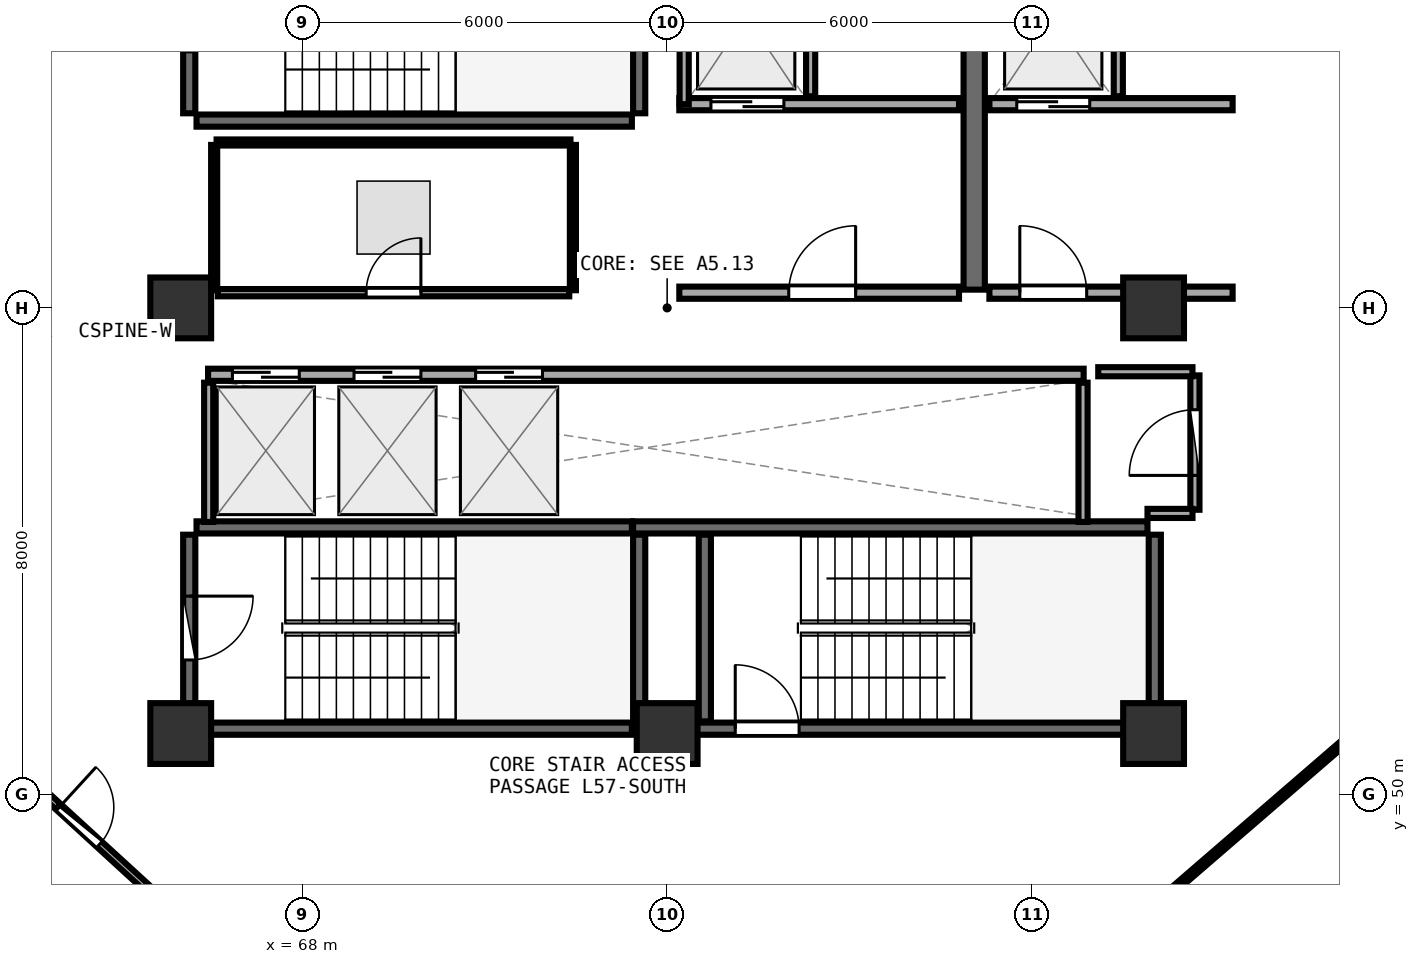
"""IFC4 building model, lengths in metres.
Left out: names, types, materials, properties, quantities, classifications, styles, units other than length and angle.
Written with IfcOpenShell. Run it as: python <this file> out.ifc"""

import sys

from ifc_helpers import new_model, si_unit, direction, frame, frame_2d, origin, origin_2d, place, context, subcontext, project, spatial, rectangle, extrude, element, fill, save


model = new_model("IFC4")
c1 = context("Model", 3, precision=1e-05, world=origin(), true_north=direction((0.0, 1.0)))
c2 = subcontext(c1, "Body", "Model", "MODEL_VIEW")
j1 = project(units=[si_unit("LENGTHUNIT", "METRE"), si_unit("PLANEANGLEUNIT", "RADIAN")], contexts=[c1])
p1 = place(None, origin())
s1 = spatial("IfcSite", under=j1, at=p1, CompositionType="ELEMENT")
p2 = place(p1, origin())
s2 = spatial("IfcBuilding", under=s1, at=p2, CompositionType="ELEMENT")
p3 = place(p2, frame((0.0, 0.0, 223.2)))
s3 = spatial("IfcBuildingStorey", under=s2, at=p3, CompositionType="ELEMENT", Elevation=223.2)
for number, where, z_axis, x_axis in (
    (1, (66.0, 51.0, 0.0), (0.0, 0.0, 1.0), (1.0, 0.0, 0.0)),
    (2, (74.0, 51.0, 0.0), (0.0, 0.0, 1.0), (1.0, 0.0, 0.0)),
    (3, (82.0, 51.0, 0.0), (0.0, 0.0, 1.0), (1.0, 0.0, 0.0)),
    (4, (82.0, 58.0, 0.0), (0.0, 0.0, 1.0), (1.0, 0.0, 0.0)),
    (5, (66.0, 58.0, 0.0), (0.0, 0.0, 1.0), (1.0, 0.0, 0.0)),
):
    element("IfcColumn", number, at=place(p3, frame(where, z_axis=z_axis, x_axis=x_axis)), inside=s3, PredefinedType="PILASTER", context=c2, shape_type="SweptSolid", body=[
        extrude(rectangle(XDim=1.0, YDim=1.0, at=origin_2d()), origin(), (0.0, 0.0, 1.0), 3.75),
    ])
p4 = place(p3, frame((66.26, 61.08, 0.0), z_axis=(0.0, 0.0, 1.0), x_axis=(1.0, 0.0, 0.0)))
e6 = element("IfcWall", 6, at=p4, inside=s3, PredefinedType="SHEAR", context=c2, shape_type="SweptSolid", body=[
    extrude(rectangle(XDim=7.16, YDim=0.2, at=frame_2d((3.58, 0.0))), origin(), (0.0, 0.0, 1.0), 3.49),
])
p5 = place(p3, frame((73.54, 61.2, 0.0), z_axis=(0.0, 0.0, 1.0), x_axis=(0.0, 1.0, 0.0)))
e7 = element("IfcWall", 7, at=p5, inside=s3, PredefinedType="SHEAR", context=c2, shape_type="SweptSolid", body=[
    extrude(rectangle(XDim=3.07, YDim=0.2, at=frame_2d((1.535, 0.0))), origin(), (0.0, 0.0, 1.0), 3.49),
])
p6 = place(p3, frame((66.14, 64.27, 0.0), z_axis=(0.0, 0.0, 1.0), x_axis=(0.0, -1.0, 0.0)))
e8 = element("IfcWall", 8, at=p6, inside=s3, PredefinedType="SHEAR", context=c2, shape_type="SweptSolid", body=[
    extrude(rectangle(XDim=3.07, YDim=0.2, at=frame_2d((1.535, 0.0))), origin(), (0.0, 0.0, 1.0), 3.49),
])
p7 = place(p6, frame((1.01, 0.0, 0.0)))
e9 = element("IfcOpeningElement", 9, at=p7, cuts=e8, PredefinedType="OPENING", context=c2, shape_type="SweptSolid", body=[
    extrude(rectangle(XDim=1.05, YDim=2.1, at=frame_2d((0.525, 1.05))), frame((0.0, 0.11, 0.0), z_axis=(0.0, -1.0, 0.0), x_axis=(1.0, 0.0, 0.0)), (0.0, 0.0, 1.0), 0.22),
])
p8 = place(p3, frame((74.0, 51.08, 0.0), z_axis=(0.0, 0.0, 1.0), x_axis=(1.0, 0.0, 0.0)))
e10 = element("IfcWall", 10, at=p8, inside=s3, PredefinedType="SHEAR", context=c2, shape_type="SweptSolid", body=[
    extrude(rectangle(XDim=7.9, YDim=0.2, at=frame_2d((3.95, 0.0))), origin(), (0.0, 0.0, 1.0), 3.49),
])
p9 = place(p8, frame((1.12, 0.0, 0.0)))
e11 = element("IfcOpeningElement", 11, at=p9, cuts=e10, PredefinedType="OPENING", context=c2, shape_type="SweptSolid", body=[
    extrude(rectangle(XDim=1.05, YDim=2.1, at=frame_2d((0.525, 1.05))), frame((0.0, 0.11, 0.0), z_axis=(0.0, -1.0, 0.0), x_axis=(1.0, 0.0, 0.0)), (0.0, 0.0, 1.0), 0.22),
])
p10 = place(p3, frame((82.02, 51.2, 0.0), z_axis=(0.0, 0.0, 1.0), x_axis=(0.0, 1.0, 0.0)))
e12 = element("IfcWall", 12, at=p10, inside=s3, PredefinedType="SHEAR", context=c2, shape_type="SweptSolid", body=[
    extrude(rectangle(XDim=3.07, YDim=0.2, at=frame_2d((1.535, 0.0))), origin(), (0.0, 0.0, 1.0), 3.49),
])
p11 = place(p3, frame((81.9, 54.39, 0.0), z_axis=(0.0, 0.0, 1.0), x_axis=(-1.0, 0.0, 0.0)))
e13 = element("IfcWall", 13, at=p11, inside=s3, PredefinedType="SHEAR", context=c2, shape_type="SweptSolid", body=[
    extrude(rectangle(XDim=8.46, YDim=0.2, at=frame_2d((4.23, 0.0))), origin(), (0.0, 0.0, 1.0), 3.49),
])
p12 = place(p3, frame((74.62, 54.27, 0.0), z_axis=(0.0, 0.0, 1.0), x_axis=(0.0, -1.0, 0.0)))
e14 = element("IfcWall", 14, at=p12, inside=s3, PredefinedType="SHEAR", context=c2, shape_type="SweptSolid", body=[
    extrude(rectangle(XDim=3.07, YDim=0.2, at=frame_2d((1.535, 0.0))), origin(), (0.0, 0.0, 1.0), 3.49),
])
p13 = place(p3, frame((66.26, 51.08, 0.0), z_axis=(0.0, 0.0, 1.0), x_axis=(1.0, 0.0, 0.0)))
e15 = element("IfcWall", 15, at=p13, inside=s3, PredefinedType="SHEAR", context=c2, shape_type="SweptSolid", body=[
    extrude(rectangle(XDim=7.16, YDim=0.2, at=frame_2d((3.58, 0.0))), origin(), (0.0, 0.0, 1.0), 3.49),
])
p14 = place(p3, frame((73.54, 51.2, 0.0), z_axis=(0.0, 0.0, 1.0), x_axis=(0.0, 1.0, 0.0)))
e16 = element("IfcWall", 16, at=p14, inside=s3, PredefinedType="SHEAR", context=c2, shape_type="SweptSolid", body=[
    extrude(rectangle(XDim=3.07, YDim=0.2, at=frame_2d((1.535, 0.0))), origin(), (0.0, 0.0, 1.0), 3.49),
])
p15 = place(p3, frame((73.42, 54.39, 0.0), z_axis=(0.0, 0.0, 1.0), x_axis=(-1.0, 0.0, 0.0)))
e17 = element("IfcWall", 17, at=p15, inside=s3, PredefinedType="SHEAR", context=c2, shape_type="SweptSolid", body=[
    extrude(rectangle(XDim=7.16, YDim=0.2, at=frame_2d((3.58, 0.0))), origin(), (0.0, 0.0, 1.0), 3.49),
])
p16 = place(p3, frame((66.14, 54.27, 0.0), z_axis=(0.0, 0.0, 1.0), x_axis=(0.0, -1.0, 0.0)))
e18 = element("IfcWall", 18, at=p16, inside=s3, PredefinedType="SHEAR", context=c2, shape_type="SweptSolid", body=[
    extrude(rectangle(XDim=3.07, YDim=0.2, at=frame_2d((1.535, 0.0))), origin(), (0.0, 0.0, 1.0), 3.49),
])
p17 = place(p16, frame((1.01, 0.0, 0.0)))
e19 = element("IfcOpeningElement", 19, at=p17, cuts=e18, PredefinedType="OPENING", context=c2, shape_type="SweptSolid", body=[
    extrude(rectangle(XDim=1.05, YDim=2.1, at=frame_2d((0.525, 1.05))), frame((0.0, 0.11, 0.0), z_axis=(0.0, -1.0, 0.0), x_axis=(1.0, 0.0, 0.0)), (0.0, 0.0, 1.0), 0.22),
])
p18 = place(p3, frame((79.05, 58.3, 0.0), z_axis=(0.0, 0.0, 1.0), x_axis=(0.0, 1.0, 0.0)))
e20 = element("IfcWall", 20, at=p18, inside=s3, PredefinedType="SHEAR", context=c2, shape_type="SweptSolid", body=[
    extrude(rectangle(XDim=6.3, YDim=0.35, at=frame_2d((3.15, 0.0))), origin(), (0.0, 0.0, 1.0), 3.49),
])
p19 = place(p3, frame((74.2, 61.35, 0.0), z_axis=(0.0, 0.0, 1.0), x_axis=(1.0, 0.0, 0.0)))
e21 = element("IfcWall", 21, at=p19, inside=s3, PredefinedType="SOLIDWALL", context=c2, shape_type="SweptSolid", body=[
    extrude(rectangle(XDim=4.6, YDim=0.2, at=frame_2d((2.3, 0.0))), origin(), (0.0, 0.0, 1.0), 3.48),
])
p20 = place(p19, frame((0.52, 0.0, 0.0)))
e22 = element("IfcOpeningElement", 22, at=p20, cuts=e21, PredefinedType="OPENING", context=c2, shape_type="SweptSolid", body=[
    extrude(rectangle(XDim=1.2, YDim=2.15, at=frame_2d((0.6, 1.075))), frame((0.0, 0.11, 0.0), z_axis=(0.0, -1.0, 0.0), x_axis=(1.0, 0.0, 0.0)), (0.0, 0.0, 1.0), 0.22),
])
p21 = place(p3, frame((74.28, 61.35, 0.0), z_axis=(0.0, 0.0, 1.0), x_axis=(0.0, 1.0, 0.0)))
e23 = element("IfcWall", 23, at=p21, inside=s3, PredefinedType="PARTITIONING", context=c2, shape_type="SweptSolid", body=[
    extrude(rectangle(XDim=2.97, YDim=0.15, at=frame_2d((1.485, 0.0))), origin(), (0.0, 0.0, 1.0), 3.48),
])
p22 = place(p3, frame((76.36, 61.48, 0.0), z_axis=(0.0, 0.0, 1.0), x_axis=(0.0, 1.0, 0.0)))
e24 = element("IfcWall", 24, at=p22, inside=s3, PredefinedType="PARTITIONING", context=c2, shape_type="SweptSolid", body=[
    extrude(rectangle(XDim=2.84, YDim=0.15, at=frame_2d((1.42, 0.0))), origin(), (0.0, 0.0, 1.0), 3.48),
])
p23 = place(p3, frame((79.3, 61.35, 0.0), z_axis=(0.0, 0.0, 1.0), x_axis=(1.0, 0.0, 0.0)))
e25 = element("IfcWall", 25, at=p23, inside=s3, PredefinedType="SOLIDWALL", context=c2, shape_type="SweptSolid", body=[
    extrude(rectangle(XDim=4.0, YDim=0.2, at=frame_2d((2.0, 0.0))), origin(), (0.0, 0.0, 1.0), 2.775),
])
p24 = place(p23, frame((0.45, 0.0, 0.0)))
e26 = element("IfcOpeningElement", 26, at=p24, cuts=e25, PredefinedType="OPENING", context=c2, shape_type="SweptSolid", body=[
    extrude(rectangle(XDim=1.2, YDim=2.15, at=frame_2d((0.6, 1.075))), frame((0.0, 0.11, 0.0), z_axis=(0.0, -1.0, 0.0), x_axis=(1.0, 0.0, 0.0)), (0.0, 0.0, 1.0), 0.22),
])
p25 = place(p3, frame((81.42, 61.48, 0.0), z_axis=(0.0, 0.0, 1.0), x_axis=(0.0, 1.0, 0.0)))
e27 = element("IfcWall", 27, at=p25, inside=s3, PredefinedType="PARTITIONING", context=c2, shape_type="SweptSolid", body=[
    extrude(rectangle(XDim=2.84, YDim=0.15, at=frame_2d((1.42, 0.0))), origin(), (0.0, 0.0, 1.0), 3.48),
])
p26 = place(p3, frame((74.2, 58.25, 0.0), z_axis=(0.0, 0.0, 1.0), x_axis=(1.0, 0.0, 0.0)))
e28 = element("IfcWall", 28, at=p26, inside=s3, PredefinedType="SOLIDWALL", context=c2, shape_type="SweptSolid", body=[
    extrude(rectangle(XDim=4.6, YDim=0.2, at=frame_2d((2.3, 0.0))), origin(), (0.0, 0.0, 1.0), 3.48),
])
p27 = place(p26, frame((1.8, 0.0, 0.0)))
e29 = element("IfcOpeningElement", 29, at=p27, cuts=e28, PredefinedType="OPENING", context=c2, shape_type="SweptSolid", body=[
    extrude(rectangle(XDim=1.1, YDim=2.1, at=frame_2d((0.55, 1.05))), frame((0.0, 0.11, 0.0), z_axis=(0.0, -1.0, 0.0), x_axis=(1.0, 0.0, 0.0)), (0.0, 0.0, 1.0), 0.22),
])
p28 = place(p3, frame((79.3, 58.25, 0.0), z_axis=(0.0, 0.0, 1.0), x_axis=(1.0, 0.0, 0.0)))
e30 = element("IfcWall", 30, at=p28, inside=s3, PredefinedType="SOLIDWALL", context=c2, shape_type="SweptSolid", body=[
    extrude(rectangle(XDim=4.0, YDim=0.2, at=frame_2d((2.0, 0.0))), origin(), (0.0, 0.0, 1.0), 2.775),
])
p29 = place(p28, frame((0.5, 0.0, 0.0)))
e31 = element("IfcOpeningElement", 31, at=p29, cuts=e30, PredefinedType="OPENING", context=c2, shape_type="SweptSolid", body=[
    extrude(rectangle(XDim=1.1, YDim=2.1, at=frame_2d((0.55, 1.05))), frame((0.0, 0.11, 0.0), z_axis=(0.0, -1.0, 0.0), x_axis=(1.0, 0.0, 0.0)), (0.0, 0.0, 1.0), 0.22),
])
p30 = place(p3, frame((66.45, 56.9, 0.0), z_axis=(0.0, 0.0, 1.0), x_axis=(1.0, 0.0, 0.0)))
e32 = element("IfcWall", 32, at=p30, inside=s3, PredefinedType="SOLIDWALL", context=c2, shape_type="SweptSolid", body=[
    extrude(rectangle(XDim=14.4, YDim=0.2, at=frame_2d((7.2, 0.0))), origin(), (0.0, 0.0, 1.0), 3.48),
])
p31 = place(p30, frame((0.4, 0.0, 0.0)))
e33 = element("IfcOpeningElement", 33, at=p31, cuts=e32, PredefinedType="OPENING", context=c2, shape_type="SweptSolid", body=[
    extrude(rectangle(XDim=1.1, YDim=2.1, at=frame_2d((0.55, 1.05))), frame((0.0, 0.11, 0.0), z_axis=(0.0, -1.0, 0.0), x_axis=(1.0, 0.0, 0.0)), (0.0, 0.0, 1.0), 0.22),
])
p32 = place(p30, frame((2.4, 0.0, 0.0)))
e34 = element("IfcOpeningElement", 34, at=p32, cuts=e32, PredefinedType="OPENING", context=c2, shape_type="SweptSolid", body=[
    extrude(rectangle(XDim=1.1, YDim=2.1, at=frame_2d((0.55, 1.05))), frame((0.0, 0.11, 0.0), z_axis=(0.0, -1.0, 0.0), x_axis=(1.0, 0.0, 0.0)), (0.0, 0.0, 1.0), 0.22),
])
p33 = place(p30, frame((4.4, 0.0, 0.0)))
e35 = element("IfcOpeningElement", 35, at=p33, cuts=e32, PredefinedType="OPENING", context=c2, shape_type="SweptSolid", body=[
    extrude(rectangle(XDim=1.1, YDim=2.1, at=frame_2d((0.55, 1.05))), frame((0.0, 0.11, 0.0), z_axis=(0.0, -1.0, 0.0), x_axis=(1.0, 0.0, 0.0)), (0.0, 0.0, 1.0), 0.22),
])
for number, where, z_axis, x_axis in (
    (36, (66.46, 54.48, 0.0), (0.0, 0.0, 1.0), (0.0, 1.0, 0.0)),
    (37, (80.84, 54.48, 0.0), (0.0, 0.0, 1.0), (0.0, 1.0, 0.0)),
):
    element("IfcWall", number, at=place(p3, frame(where, z_axis=z_axis, x_axis=x_axis)), inside=s3, PredefinedType="PARTITIONING", context=c2, shape_type="SweptSolid", body=[
        extrude(rectangle(XDim=2.29, YDim=0.15, at=frame_2d((1.145, 0.0))), origin(), (0.0, 0.0, 1.0), 3.48),
    ])
p34 = place(p3, frame((82.68, 54.68, 0.0), z_axis=(0.0, 0.0, 1.0), x_axis=(0.0, 1.0, 0.0)))
e38 = element("IfcWall", 38, at=p34, inside=s3, PredefinedType="PARTITIONING", context=c2, shape_type="SweptSolid", body=[
    extrude(rectangle(XDim=2.21, YDim=0.15, at=frame_2d((1.105, 0.0))), origin(), (0.0, 0.0, 1.0), 3.48),
])
p35 = place(p34, frame((0.565, 0.0, 0.0)))
e39 = element("IfcOpeningElement", 39, at=p35, cuts=e38, PredefinedType="OPENING", context=c2, shape_type="SweptSolid", body=[
    extrude(rectangle(XDim=1.08, YDim=2.1, at=frame_2d((0.54, 1.05))), frame((0.0, 0.085, 0.0), z_axis=(0.0, -1.0, 0.0), x_axis=(1.0, 0.0, 0.0)), (0.0, 0.0, 1.0), 0.17),
])
p36 = place(p3, frame((66.61, 58.25, 0.0), z_axis=(0.0, 0.0, 1.0), x_axis=(1.0, 0.0, 0.0)))
e40 = element("IfcWall", 40, at=p36, inside=s3, PredefinedType="PARTITIONING", context=c2, shape_type="SweptSolid", body=[
    extrude(rectangle(XDim=5.78, YDim=0.12, at=frame_2d((2.89, 0.0))), origin(), (0.0, 0.0, 1.0), 3.48),
])
p37 = place(p36, frame((2.44, 0.0, 0.0)))
e41 = element("IfcOpeningElement", 41, at=p37, cuts=e40, PredefinedType="OPENING", context=c2, shape_type="SweptSolid", body=[
    extrude(rectangle(XDim=0.9, YDim=2.08, at=frame_2d((0.45, 1.04))), frame((0.0, 0.07, 0.0), z_axis=(0.0, -1.0, 0.0), x_axis=(1.0, 0.0, 0.0)), (0.0, 0.0, 1.0), 0.14),
])
p38 = place(p3, frame((62.803, 50.879, 0.0), z_axis=(0.0, 0.0, 1.0), x_axis=(0.737723633035, -0.675102837545, 0.0)))
e42 = element("IfcWall", 42, at=p38, inside=s3, PredefinedType="PARTITIONING", context=c2, shape_type="SweptSolid", body=[
    extrude(rectangle(XDim=4.144, YDim=0.12, at=frame_2d((2.072, 0.0))), origin(), (0.0, 0.0, 1.0), 3.025),
])
p39 = place(p38, frame((1.622, 0.0, 0.0)))
e43 = element("IfcOpeningElement", 43, at=p39, cuts=e42, PredefinedType="OPENING", context=c2, shape_type="SweptSolid", body=[
    extrude(rectangle(XDim=0.9, YDim=2.08, at=frame_2d((0.45, 1.04))), frame((0.0, 0.07, 0.0), z_axis=(0.0, -1.0, 0.0), x_axis=(1.0, 0.0, 0.0)), (0.0, 0.0, 1.0), 0.14),
])
p40 = place(p3, frame((81.9, 54.62, 0.0), z_axis=(0.0, 0.0, 1.0), x_axis=(1.0, 0.0, 0.0)))
e44 = element("IfcWall", 44, at=p40, inside=s3, PredefinedType="PARTITIONING", context=c2, shape_type="SweptSolid", body=[
    extrude(rectangle(XDim=0.74, YDim=0.15, at=frame_2d((0.37, 0.0))), origin(), (0.0, 0.0, 1.0), 2.775),
])
p41 = place(p3, frame((82.64, 56.95, 0.0), z_axis=(0.0, 0.0, 1.0), x_axis=(-1.0, 0.0, 0.0)))
e45 = element("IfcWall", 45, at=p41, inside=s3, PredefinedType="PARTITIONING", context=c2, shape_type="SweptSolid", body=[
    extrude(rectangle(XDim=1.55, YDim=0.15, at=frame_2d((0.775, 0.0))), origin(), (0.0, 0.0, 1.0), 2.775),
])
p42 = place(p3, frame((72.45, 58.29, 0.0), z_axis=(0.0, 0.0, 1.0), x_axis=(0.0, 1.0, 0.0)))
e46 = element("IfcWall", 46, at=p42, inside=s3, PredefinedType="PARTITIONING", context=c2, shape_type="SweptSolid", body=[
    extrude(rectangle(XDim=2.39, YDim=0.1, at=frame_2d((1.195, 0.0))), origin(), (0.0, 0.0, 1.0), 3.48),
])
p43 = place(p3, frame((72.41, 60.72, 0.0), z_axis=(0.0, 0.0, 1.0), x_axis=(-1.0, 0.0, 0.0)))
e47 = element("IfcWall", 47, at=p43, inside=s3, PredefinedType="PARTITIONING", context=c2, shape_type="SweptSolid", body=[
    extrude(rectangle(XDim=5.82, YDim=0.1, at=frame_2d((2.91, 0.0))), origin(), (0.0, 0.0, 1.0), 3.48),
])
p44 = place(p3, frame((66.55, 60.68, 0.0), z_axis=(0.0, 0.0, 1.0), x_axis=(0.0, -1.0, 0.0)))
e48 = element("IfcWall", 48, at=p44, inside=s3, PredefinedType="PARTITIONING", context=c2, shape_type="SweptSolid", body=[
    extrude(rectangle(XDim=2.39, YDim=0.1, at=frame_2d((1.195, 0.0))), origin(), (0.0, 0.0, 1.0), 3.48),
])
p45 = place(p3, frame((81.367, 47.604, 0.0), z_axis=(0.0, 0.0, 1.0), x_axis=(0.756843194568, 0.653596495428, 0.0)))
e49 = element("IfcWall", 49, at=p45, inside=s3, PredefinedType="PARTITIONING", context=c2, shape_type="SweptSolid", body=[
    extrude(rectangle(XDim=5.167, YDim=0.1, at=frame_2d((2.583, 0.0))), origin(), (0.0, 0.0, 1.0), 3.025),
])
p46 = place(p9, origin())
e50 = element("IfcDoor", 50, at=p46, inside=s3, OperationType="SINGLE_SWING_LEFT", PredefinedType="DOOR", context=c2, shape_type="SweptSolid", body=[
    extrude(rectangle(XDim=1.05, YDim=2.1, at=frame_2d((0.525, 1.05))), frame((0.0, 0.025, 0.0), z_axis=(0.0, -1.0, 0.0), x_axis=(1.0, 0.0, 0.0)), (0.0, 0.0, 1.0), 0.05),
])
fill(e11, e50)
p47 = place(p17, origin())
e51 = element("IfcDoor", 51, at=p47, inside=s3, OperationType="SINGLE_SWING_LEFT", PredefinedType="DOOR", context=c2, shape_type="SweptSolid", body=[
    extrude(rectangle(XDim=1.05, YDim=2.1, at=frame_2d((0.525, 1.05))), frame((0.0, 0.025, 0.0), z_axis=(0.0, -1.0, 0.0), x_axis=(1.0, 0.0, 0.0)), (0.0, 0.0, 1.0), 0.05),
])
fill(e19, e51)
p48 = place(p20, origin())
e52 = element("IfcDoor", 52, at=p48, inside=s3, OperationType="DOUBLE_DOOR_SLIDING", PredefinedType="DOOR", context=c2, shape_type="SweptSolid", body=[
    extrude(rectangle(XDim=1.2, YDim=2.15, at=frame_2d((0.6, 1.075))), frame((0.0, 0.025, 0.0), z_axis=(0.0, -1.0, 0.0), x_axis=(1.0, 0.0, 0.0)), (0.0, 0.0, 1.0), 0.05),
])
fill(e22, e52)
p49 = place(p24, origin())
e53 = element("IfcDoor", 53, at=p49, inside=s3, OperationType="DOUBLE_DOOR_SLIDING", PredefinedType="DOOR", context=c2, shape_type="SweptSolid", body=[
    extrude(rectangle(XDim=1.2, YDim=2.15, at=frame_2d((0.6, 1.075))), frame((0.0, 0.025, 0.0), z_axis=(0.0, -1.0, 0.0), x_axis=(1.0, 0.0, 0.0)), (0.0, 0.0, 1.0), 0.05),
])
fill(e26, e53)
p50 = place(p27, frame((1.1, 0.0, 0.0), z_axis=(0.0, 0.0, 1.0), x_axis=(-1.0, 0.0, 0.0)))
e54 = element("IfcDoor", 54, at=p50, inside=s3, OperationType="SINGLE_SWING_LEFT", PredefinedType="DOOR", context=c2, shape_type="SweptSolid", body=[
    extrude(rectangle(XDim=1.1, YDim=2.1, at=frame_2d((0.55, 1.05))), frame((0.0, 0.025, 0.0), z_axis=(0.0, -1.0, 0.0), x_axis=(1.0, 0.0, 0.0)), (0.0, 0.0, 1.0), 0.05),
])
fill(e29, e54)
p51 = place(p29, frame((1.1, 0.0, 0.0), z_axis=(0.0, 0.0, 1.0), x_axis=(-1.0, 0.0, 0.0)))
e55 = element("IfcDoor", 55, at=p51, inside=s3, OperationType="SINGLE_SWING_RIGHT", PredefinedType="DOOR", context=c2, shape_type="SweptSolid", body=[
    extrude(rectangle(XDim=1.1, YDim=2.1, at=frame_2d((0.55, 1.05))), frame((0.0, 0.025, 0.0), z_axis=(0.0, -1.0, 0.0), x_axis=(1.0, 0.0, 0.0)), (0.0, 0.0, 1.0), 0.05),
])
fill(e31, e55)
p52 = place(p31, origin())
e56 = element("IfcDoor", 56, at=p52, inside=s3, OperationType="DOUBLE_DOOR_SLIDING", PredefinedType="DOOR", context=c2, shape_type="SweptSolid", body=[
    extrude(rectangle(XDim=1.1, YDim=2.1, at=frame_2d((0.55, 1.05))), frame((0.0, 0.025, 0.0), z_axis=(0.0, -1.0, 0.0), x_axis=(1.0, 0.0, 0.0)), (0.0, 0.0, 1.0), 0.05),
])
fill(e33, e56)
p53 = place(p32, origin())
e57 = element("IfcDoor", 57, at=p53, inside=s3, OperationType="DOUBLE_DOOR_SLIDING", PredefinedType="DOOR", context=c2, shape_type="SweptSolid", body=[
    extrude(rectangle(XDim=1.1, YDim=2.1, at=frame_2d((0.55, 1.05))), frame((0.0, 0.025, 0.0), z_axis=(0.0, -1.0, 0.0), x_axis=(1.0, 0.0, 0.0)), (0.0, 0.0, 1.0), 0.05),
])
fill(e34, e57)
p54 = place(p33, origin())
e58 = element("IfcDoor", 58, at=p54, inside=s3, OperationType="DOUBLE_DOOR_SLIDING", PredefinedType="DOOR", context=c2, shape_type="SweptSolid", body=[
    extrude(rectangle(XDim=1.1, YDim=2.1, at=frame_2d((0.55, 1.05))), frame((0.0, 0.025, 0.0), z_axis=(0.0, -1.0, 0.0), x_axis=(1.0, 0.0, 0.0)), (0.0, 0.0, 1.0), 0.05),
])
fill(e35, e58)
p55 = place(p35, origin())
e59 = element("IfcDoor", 59, at=p55, inside=s3, OperationType="SINGLE_SWING_LEFT", PredefinedType="DOOR", context=c2, shape_type="SweptSolid", body=[
    extrude(rectangle(XDim=1.08, YDim=2.1, at=frame_2d((0.54, 1.05))), frame((0.0, 0.025, 0.0), z_axis=(0.0, -1.0, 0.0), x_axis=(1.0, 0.0, 0.0)), (0.0, 0.0, 1.0), 0.05),
])
fill(e39, e59)
p56 = place(p37, origin())
e60 = element("IfcDoor", 60, at=p56, inside=s3, OperationType="SINGLE_SWING_RIGHT", PredefinedType="DOOR", context=c2, shape_type="SweptSolid", body=[
    extrude(rectangle(XDim=0.9, YDim=2.08, at=frame_2d((0.45, 1.04))), frame((0.0, 0.025, 0.0), z_axis=(0.0, -1.0, 0.0), x_axis=(1.0, 0.0, 0.0)), (0.0, 0.0, 1.0), 0.05),
])
fill(e41, e60)
p57 = place(p39, origin())
e61 = element("IfcDoor", 61, at=p57, inside=s3, OperationType="SINGLE_SWING_LEFT", PredefinedType="DOOR", context=c2, shape_type="SweptSolid", body=[
    extrude(rectangle(XDim=0.9, YDim=2.08, at=frame_2d((0.45, 1.04))), frame((0.0, 0.025, 0.0), z_axis=(0.0, -1.0, 0.0), x_axis=(1.0, 0.0, 0.0)), (0.0, 0.0, 1.0), 0.05),
])
fill(e43, e61)
save(model, sys.argv[1])
